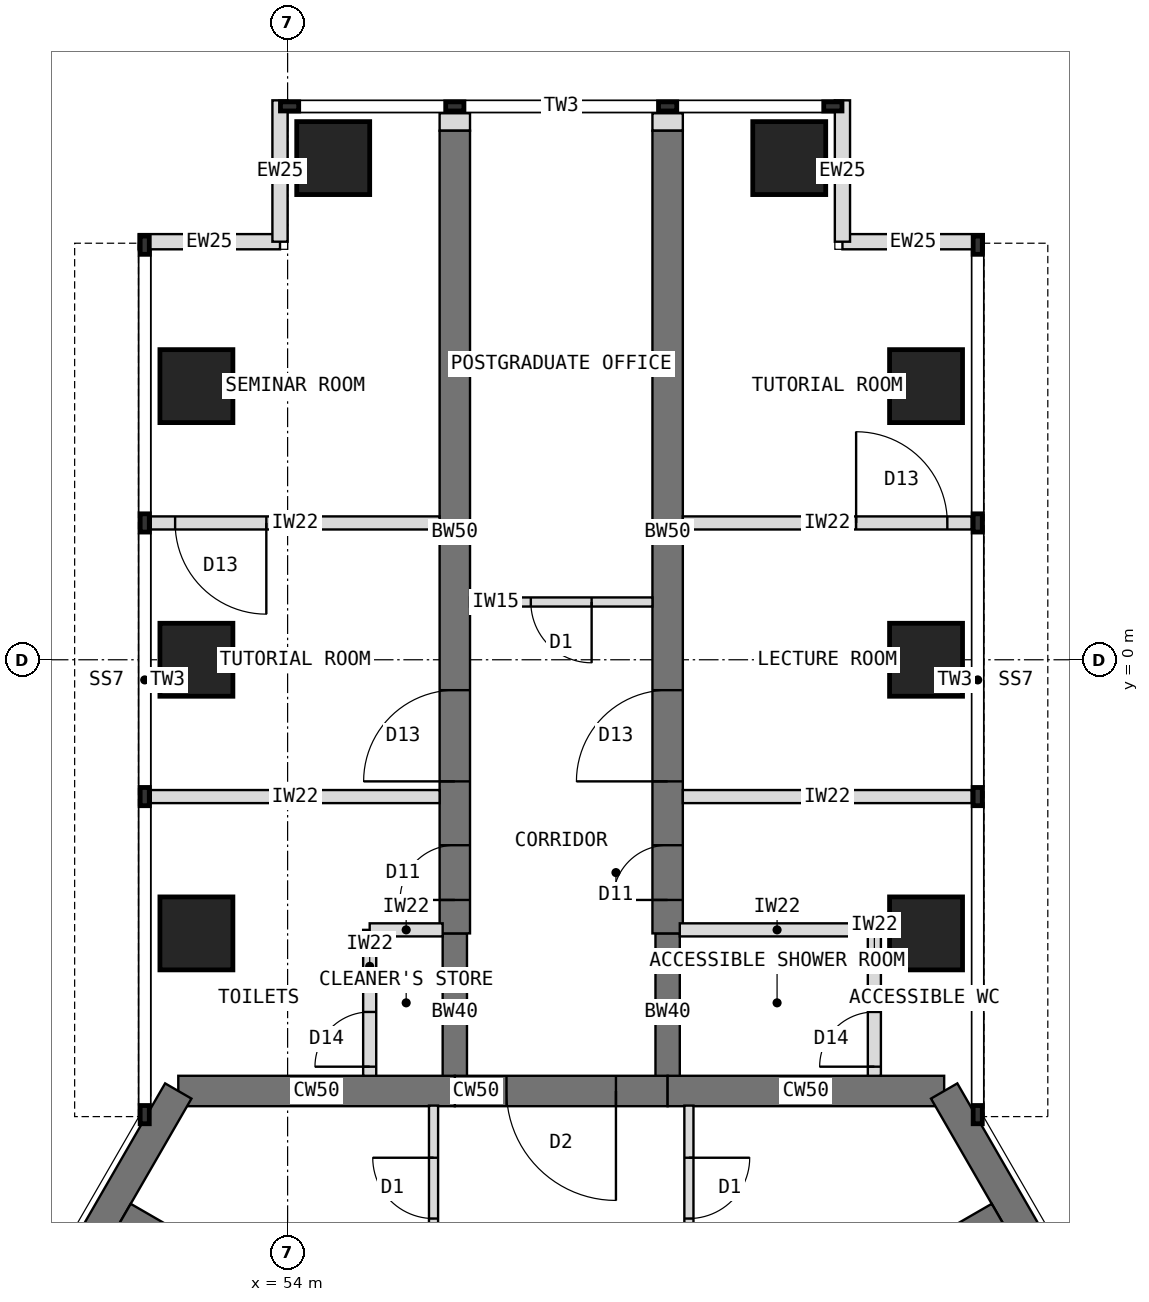
"""IFC4 building model, lengths in metres.
Left out: names, types, materials, properties, quantities, classifications, styles, units other than length and angle.
Written with IfcOpenShell. Run it as: python <this file> out.ifc"""

import sys

from ifc_helpers import new_model, si_unit, direction, frame, frame_2d, origin, origin_2d, place, context, subcontext, project, spatial, rectangle, extrude, element, fill, save


model = new_model("IFC4")
c1 = context("Model", 3, precision=1e-05, world=origin(), true_north=direction((0.0, 1.0)))
c2 = subcontext(c1, "Body", "Model", "MODEL_VIEW")
j1 = project(units=[si_unit("LENGTHUNIT", "METRE"), si_unit("PLANEANGLEUNIT", "RADIAN")], contexts=[c1])
p1 = place(None, origin())
s1 = spatial("IfcSite", under=j1, at=p1, CompositionType="ELEMENT")
p2 = place(p1, origin())
s2 = spatial("IfcBuilding", under=s1, at=p2, CompositionType="ELEMENT")
p3 = place(p2, frame((0.0, 0.0, 186.5)))
s3 = spatial("IfcBuildingStorey", under=s2, at=p3, CompositionType="ELEMENT", Elevation=186.5)
p4 = place(p3, frame((64.798, -7.092, 0.0), z_axis=(0.0, 0.0, 1.0), x_axis=(-1.0, 0.0, 0.0)))
e1 = element("IfcWall", 1, at=p4, inside=s3, PredefinedType="SHEAR", context=c2, shape_type="SweptSolid", body=[
    extrude(rectangle(XDim=4.548, YDim=0.5, at=frame_2d((2.274, 0.0))), origin(), (0.0, 0.0, 1.0), 4.0),
])
p5 = place(p3, frame((60.25, -7.092, 0.0), z_axis=(0.0, 0.0, 1.0), x_axis=(-1.0, 0.0, 0.0)))
e2 = element("IfcWall", 2, at=p5, inside=s3, PredefinedType="SHEAR", context=c2, shape_type="SweptSolid", body=[
    extrude(rectangle(XDim=3.5, YDim=0.5, at=frame_2d((1.75, 0.0))), origin(), (0.0, 0.0, 1.0), 4.0),
])
p6 = place(p5, frame((0.85, 0.0, 0.0)))
e3 = element("IfcOpeningElement", 3, at=p6, cuts=e2, PredefinedType="OPENING", context=c2, shape_type="SweptSolid", body=[
    extrude(rectangle(XDim=1.8, YDim=2.1, at=frame_2d((0.9, 1.05))), frame((0.0, 0.26, 0.0), z_axis=(0.0, -1.0, 0.0), x_axis=(1.0, 0.0, 0.0)), (0.0, 0.0, 1.0), 0.52),
])
p7 = place(p3, frame((56.75, -7.092, 0.0), z_axis=(0.0, 0.0, 1.0), x_axis=(-1.0, 0.0, 0.0)))
e4 = element("IfcWall", 4, at=p7, inside=s3, PredefinedType="SHEAR", context=c2, shape_type="SweptSolid", body=[
    extrude(rectangle(XDim=4.548, YDim=0.5, at=frame_2d((2.274, 0.0))), origin(), (0.0, 0.0, 1.0), 4.0),
])
for number, where, z_axis, x_axis in (
    (5, (52.202, -7.092, 0.0), (0.0, 0.0, 1.0), (-0.5, -0.866, 0.0)),
    (6, (71.096, -18.0, 0.0), (0.0, 0.0, 1.0), (-0.5, 0.866, 0.0)),
):
    element("IfcWall", number, at=place(p3, frame(where, z_axis=z_axis, x_axis=x_axis)), inside=s3, PredefinedType="SHEAR", context=c2, shape_type="SweptSolid", body=[
        extrude(rectangle(XDim=12.596, YDim=0.5, at=frame_2d((6.298, 0.0))), origin(), (0.0, 0.0, 1.0), 4.0),
    ])
p8 = place(p3, frame((56.75, -7.092, 0.0), z_axis=(0.0, 0.0, 1.0), x_axis=(0.0, 1.0, 0.0)))
e7 = element("IfcWall", 7, at=p8, inside=s3, PredefinedType="SHEAR", context=c2, shape_type="SweptSolid", body=[
    extrude(rectangle(XDim=2.592, YDim=0.4, at=frame_2d((1.296, 0.0))), origin(), (0.0, 0.0, 1.0), 4.0),
])
p9 = place(p3, frame((56.75, -4.5, 0.0), z_axis=(0.0, 0.0, 1.0), x_axis=(0.0, 1.0, 0.0)))
e8 = element("IfcWall", 8, at=p9, inside=s3, PredefinedType="SHEAR", context=c2, shape_type="SweptSolid", body=[
    extrude(rectangle(XDim=13.2, YDim=0.5, at=frame_2d((6.6, 0.0))), origin(), (0.0, 0.0, 1.0), 4.0),
])
p10 = place(p9, frame((0.55, 0.0, 0.0)))
e9 = element("IfcOpeningElement", 9, at=p10, cuts=e8, PredefinedType="OPENING", context=c2, shape_type="SweptSolid", body=[
    extrude(rectangle(XDim=0.9, YDim=2.1, at=frame_2d((0.45, 1.05))), frame((0.0, 0.26, 0.0), z_axis=(0.0, -1.0, 0.0), x_axis=(1.0, 0.0, 0.0)), (0.0, 0.0, 1.0), 0.52),
])
p11 = place(p9, frame((2.5, 0.0, 0.0)))
e10 = element("IfcOpeningElement", 10, at=p11, cuts=e8, PredefinedType="OPENING", context=c2, shape_type="SweptSolid", body=[
    extrude(rectangle(XDim=1.5, YDim=2.1, at=frame_2d((0.75, 1.05))), frame((0.0, 0.26, 0.0), z_axis=(0.0, -1.0, 0.0), x_axis=(1.0, 0.0, 0.0)), (0.0, 0.0, 1.0), 0.52),
])
p12 = place(p3, frame((60.25, -7.092, 0.0), z_axis=(0.0, 0.0, 1.0), x_axis=(0.0, 1.0, 0.0)))
e11 = element("IfcWall", 11, at=p12, inside=s3, PredefinedType="SHEAR", context=c2, shape_type="SweptSolid", body=[
    extrude(rectangle(XDim=2.592, YDim=0.4, at=frame_2d((1.296, 0.0))), origin(), (0.0, 0.0, 1.0), 4.0),
])
p13 = place(p3, frame((60.25, -4.5, 0.0), z_axis=(0.0, 0.0, 1.0), x_axis=(0.0, 1.0, 0.0)))
e12 = element("IfcWall", 12, at=p13, inside=s3, PredefinedType="SHEAR", context=c2, shape_type="SweptSolid", body=[
    extrude(rectangle(XDim=13.2, YDim=0.5, at=frame_2d((6.6, 0.0))), origin(), (0.0, 0.0, 1.0), 4.0),
])
p14 = place(p13, frame((0.55, 0.0, 0.0)))
e13 = element("IfcOpeningElement", 13, at=p14, cuts=e12, PredefinedType="OPENING", context=c2, shape_type="SweptSolid", body=[
    extrude(rectangle(XDim=0.9, YDim=2.1, at=frame_2d((0.45, 1.05))), frame((0.0, 0.26, 0.0), z_axis=(0.0, -1.0, 0.0), x_axis=(1.0, 0.0, 0.0)), (0.0, 0.0, 1.0), 0.52),
])
p15 = place(p13, frame((2.5, 0.0, 0.0)))
e14 = element("IfcOpeningElement", 14, at=p15, cuts=e12, PredefinedType="OPENING", context=c2, shape_type="SweptSolid", body=[
    extrude(rectangle(XDim=1.5, YDim=2.1, at=frame_2d((0.75, 1.05))), frame((0.0, 0.26, 0.0), z_axis=(0.0, -1.0, 0.0), x_axis=(1.0, 0.0, 0.0)), (0.0, 0.0, 1.0), 0.52),
])
for number, where, z_axis, x_axis in (
    (15, (52.5, -4.5, 0.0), (0.0, 0.0, 1.0), (1.0, 0.0, 0.0)),
    (16, (64.5, -4.5, 0.0), (0.0, 0.0, 1.0), (1.0, 0.0, 0.0)),
    (17, (52.5, 0.0, 0.0), (0.0, 0.0, 1.0), (1.0, 0.0, 0.0)),
    (18, (64.5, 0.0, 0.0), (0.0, 0.0, 1.0), (1.0, 0.0, 0.0)),
    (19, (52.5, 4.5, 0.0), (0.0, 0.0, 1.0), (1.0, 0.0, 0.0)),
    (20, (64.5, 4.5, 0.0), (0.0, 0.0, 1.0), (1.0, 0.0, 0.0)),
    (21, (54.75, 8.25, 0.0), (0.0, 0.0, 1.0), (1.0, 0.0, 0.0)),
    (22, (62.25, 8.25, 0.0), (0.0, 0.0, 1.0), (1.0, 0.0, 0.0)),
):
    element("IfcColumn", number, at=place(p3, frame(where, z_axis=z_axis, x_axis=x_axis)), inside=s3, PredefinedType="COLUMN", context=c2, shape_type="SweptSolid", body=[
        extrude(rectangle(XDim=1.2, YDim=1.2, at=origin_2d()), origin(), (0.0, 0.0, 1.0), 4.0),
    ])
for number, where, z_axis, x_axis in (
    (23, (51.55, 6.875, 0.0), (0.0, 0.0, 1.0), (1.0, 0.0, 0.0)),
    (24, (53.875, 6.875, 0.0), (0.0, 0.0, 1.0), (0.0, 1.0, 0.0)),
    (25, (65.45, 6.875, 0.0), (0.0, 0.0, 1.0), (-1.0, 0.0, 0.0)),
    (26, (63.125, 6.875, 0.0), (0.0, 0.0, 1.0), (0.0, 1.0, 0.0)),
):
    element("IfcWall", number, at=place(p3, frame(where, z_axis=z_axis, x_axis=x_axis)), inside=s3, PredefinedType="STANDARD", context=c2, shape_type="SweptSolid", body=[
        extrude(rectangle(XDim=2.325, YDim=0.25, at=frame_2d((1.163, 0.0))), origin(), (0.0, 0.0, 1.0), 3.8),
    ])
for number, where, z_axis, x_axis in (
    (27, (56.75, 8.7, 0.0), (0.0, 0.0, 1.0), (0.0, 1.0, 0.0)),
    (28, (60.25, 8.7, 0.0), (0.0, 0.0, 1.0), (0.0, 1.0, 0.0)),
):
    element("IfcWall", number, at=place(p3, frame(where, z_axis=z_axis, x_axis=x_axis)), inside=s3, PredefinedType="PARTITIONING", context=c2, shape_type="SweptSolid", body=[
        extrude(rectangle(XDim=0.288, YDim=0.5, at=frame_2d((0.144, 0.0))), origin(), (0.0, 0.0, 1.0), 3.8),
    ])
for number, where, z_axis, x_axis in (
    (29, (56.48, -12.099, 0.0), (0.0, 0.0, 1.0), (-0.866, 0.5, 0.0)),
    (30, (60.52, -12.099, 0.0), (0.0, 0.0, 1.0), (0.866, 0.5, 0.0)),
):
    element("IfcWall", number, at=place(p3, frame(where, z_axis=z_axis, x_axis=x_axis)), inside=s3, PredefinedType="SHEAR", context=c2, shape_type="SweptSolid", body=[
        extrude(rectangle(XDim=5.958, YDim=0.4, at=frame_2d((2.979, 0.0))), origin(), (0.0, 0.0, 1.0), 4.0),
    ])
p16 = place(p3, frame((56.5, -2.25, 0.0), z_axis=(0.0, 0.0, 1.0), x_axis=(-1.0, 0.0, 0.0)))
e31 = element("IfcWall", 31, at=p16, inside=s3, PredefinedType="PARTITIONING", context=c2, shape_type="SweptSolid", body=[
    extrude(rectangle(XDim=4.75, YDim=0.215, at=frame_2d((2.375, 0.0))), origin(), (0.0, 0.0, 1.0), 3.8),
])
p17 = place(p3, frame((56.5, 2.25, 0.0), z_axis=(0.0, 0.0, 1.0), x_axis=(-1.0, 0.0, 0.0)))
e32 = element("IfcWall", 32, at=p17, inside=s3, PredefinedType="PARTITIONING", context=c2, shape_type="SweptSolid", body=[
    extrude(rectangle(XDim=4.75, YDim=0.215, at=frame_2d((2.375, 0.0))), origin(), (0.0, 0.0, 1.0), 3.8),
])
p18 = place(p17, frame((2.85, 0.0, 0.0)))
e33 = element("IfcOpeningElement", 33, at=p18, cuts=e32, PredefinedType="OPENING", context=c2, shape_type="SweptSolid", body=[
    extrude(rectangle(XDim=1.5, YDim=2.1, at=frame_2d((0.75, 1.05))), frame((0.0, 0.117, 0.0), z_axis=(0.0, -1.0, 0.0), x_axis=(1.0, 0.0, 0.0)), (0.0, 0.0, 1.0), 0.235),
])
p19 = place(p3, frame((55.35, -6.842, 0.0), z_axis=(0.0, 0.0, 1.0), x_axis=(0.0, 1.0, 0.0)))
e34 = element("IfcWall", 34, at=p19, inside=s3, PredefinedType="PARTITIONING", context=c2, shape_type="SweptSolid", body=[
    extrude(rectangle(XDim=2.4, YDim=0.215, at=frame_2d((1.2, 0.0))), origin(), (0.0, 0.0, 1.0), 3.8),
])
p20 = place(p19, frame((0.15, 0.0, 0.0)))
e35 = element("IfcOpeningElement", 35, at=p20, cuts=e34, PredefinedType="OPENING", context=c2, shape_type="SweptSolid", body=[
    extrude(rectangle(XDim=0.9, YDim=2.1, at=frame_2d((0.45, 1.05))), frame((0.0, 0.117, 0.0), z_axis=(0.0, -1.0, 0.0), x_axis=(1.0, 0.0, 0.0)), (0.0, 0.0, 1.0), 0.235),
])
p21 = place(p3, frame((56.55, -4.442, 0.0), z_axis=(0.0, 0.0, 1.0), x_axis=(-1.0, 0.0, 0.0)))
e36 = element("IfcWall", 36, at=p21, inside=s3, PredefinedType="PARTITIONING", context=c2, shape_type="SweptSolid", body=[
    extrude(rectangle(XDim=1.2, YDim=0.215, at=frame_2d((0.6, 0.0))), origin(), (0.0, 0.0, 1.0), 3.267),
])
p22 = place(p3, frame((60.5, -2.25, 0.0), z_axis=(0.0, 0.0, 1.0), x_axis=(1.0, 0.0, 0.0)))
e37 = element("IfcWall", 37, at=p22, inside=s3, PredefinedType="PARTITIONING", context=c2, shape_type="SweptSolid", body=[
    extrude(rectangle(XDim=4.75, YDim=0.215, at=frame_2d((2.375, 0.0))), origin(), (0.0, 0.0, 1.0), 3.8),
])
p23 = place(p3, frame((60.5, 2.25, 0.0), z_axis=(0.0, 0.0, 1.0), x_axis=(1.0, 0.0, 0.0)))
e38 = element("IfcWall", 38, at=p23, inside=s3, PredefinedType="PARTITIONING", context=c2, shape_type="SweptSolid", body=[
    extrude(rectangle(XDim=4.75, YDim=0.215, at=frame_2d((2.375, 0.0))), origin(), (0.0, 0.0, 1.0), 3.8),
])
p24 = place(p23, frame((2.85, 0.0, 0.0)))
e39 = element("IfcOpeningElement", 39, at=p24, cuts=e38, PredefinedType="OPENING", context=c2, shape_type="SweptSolid", body=[
    extrude(rectangle(XDim=1.5, YDim=2.1, at=frame_2d((0.75, 1.05))), frame((0.0, 0.117, 0.0), z_axis=(0.0, -1.0, 0.0), x_axis=(1.0, 0.0, 0.0)), (0.0, 0.0, 1.0), 0.235),
])
p25 = place(p3, frame((63.65, -6.842, 0.0), z_axis=(0.0, 0.0, 1.0), x_axis=(0.0, 1.0, 0.0)))
e40 = element("IfcWall", 40, at=p25, inside=s3, PredefinedType="PARTITIONING", context=c2, shape_type="SweptSolid", body=[
    extrude(rectangle(XDim=2.4, YDim=0.215, at=frame_2d((1.2, 0.0))), origin(), (0.0, 0.0, 1.0), 3.8),
])
p26 = place(p25, frame((0.15, 0.0, 0.0)))
e41 = element("IfcOpeningElement", 41, at=p26, cuts=e40, PredefinedType="OPENING", context=c2, shape_type="SweptSolid", body=[
    extrude(rectangle(XDim=0.9, YDim=2.1, at=frame_2d((0.45, 1.05))), frame((0.0, 0.117, 0.0), z_axis=(0.0, -1.0, 0.0), x_axis=(1.0, 0.0, 0.0)), (0.0, 0.0, 1.0), 0.235),
])
p27 = place(p3, frame((60.45, -4.442, 0.0), z_axis=(0.0, 0.0, 1.0), x_axis=(1.0, 0.0, 0.0)))
e42 = element("IfcWall", 42, at=p27, inside=s3, PredefinedType="PARTITIONING", context=c2, shape_type="SweptSolid", body=[
    extrude(rectangle(XDim=3.2, YDim=0.215, at=frame_2d((1.6, 0.0))), origin(), (0.0, 0.0, 1.0), 3.267),
])
p28 = place(p3, frame((56.4, -11.857, 0.0), z_axis=(0.0, 0.0, 1.0), x_axis=(0.0, 1.0, 0.0)))
e43 = element("IfcWall", 43, at=p28, inside=s3, PredefinedType="PARTITIONING", context=c2, shape_type="SweptSolid", body=[
    extrude(rectangle(XDim=4.526, YDim=0.15, at=frame_2d((2.263, 0.0))), origin(), (0.0, 0.0, 1.0), 3.8),
])
p29 = place(p28, frame((2.668, 0.0, 0.0)))
e44 = element("IfcOpeningElement", 44, at=p29, cuts=e43, PredefinedType="OPENING", context=c2, shape_type="SweptSolid", body=[
    extrude(rectangle(XDim=1.0, YDim=2.1, at=frame_2d((0.5, 1.05))), frame((0.0, 0.085, 0.0), z_axis=(0.0, -1.0, 0.0), x_axis=(1.0, 0.0, 0.0)), (0.0, 0.0, 1.0), 0.17),
])
p30 = place(p3, frame((60.6, -7.332, 0.0), z_axis=(0.0, 0.0, 1.0), x_axis=(0.0, -1.0, 0.0)))
e45 = element("IfcWall", 45, at=p30, inside=s3, PredefinedType="PARTITIONING", context=c2, shape_type="SweptSolid", body=[
    extrude(rectangle(XDim=4.526, YDim=0.15, at=frame_2d((2.263, 0.0))), origin(), (0.0, 0.0, 1.0), 3.8),
])
p31 = place(p30, frame((0.858, 0.0, 0.0)))
e46 = element("IfcOpeningElement", 46, at=p31, cuts=e45, PredefinedType="OPENING", context=c2, shape_type="SweptSolid", body=[
    extrude(rectangle(XDim=1.0, YDim=2.1, at=frame_2d((0.5, 1.05))), frame((0.0, 0.085, 0.0), z_axis=(0.0, -1.0, 0.0), x_axis=(1.0, 0.0, 0.0)), (0.0, 0.0, 1.0), 0.17),
])
p32 = place(p3, frame((60.0, 0.95, 0.0), z_axis=(0.0, 0.0, 1.0), x_axis=(-1.0, 0.0, 0.0)))
e47 = element("IfcWall", 47, at=p32, inside=s3, PredefinedType="PARTITIONING", context=c2, shape_type="SweptSolid", body=[
    extrude(rectangle(XDim=3.0, YDim=0.15, at=frame_2d((1.5, 0.0))), origin(), (0.0, 0.0, 1.0), 3.8),
])
p33 = place(p32, frame((1.0, 0.0, 0.0)))
e48 = element("IfcOpeningElement", 48, at=p33, cuts=e47, PredefinedType="OPENING", context=c2, shape_type="SweptSolid", body=[
    extrude(rectangle(XDim=1.0, YDim=2.1, at=frame_2d((0.5, 1.05))), frame((0.0, 0.085, 0.0), z_axis=(0.0, -1.0, 0.0), x_axis=(1.0, 0.0, 0.0)), (0.0, 0.0, 1.0), 0.17),
])
p34 = place(p6, origin())
e49 = element("IfcDoor", 49, at=p34, inside=s3, OperationType="DOUBLE_DOOR_DOUBLE_SWING", PredefinedType="DOOR", context=c2, shape_type="SweptSolid", body=[
    extrude(rectangle(XDim=1.8, YDim=2.1, at=frame_2d((0.9, 1.05))), frame((0.0, 0.025, 0.0), z_axis=(0.0, -1.0, 0.0), x_axis=(1.0, 0.0, 0.0)), (0.0, 0.0, 1.0), 0.05),
])
fill(e3, e49)
p35 = place(p18, origin())
e50 = element("IfcDoor", 50, at=p35, inside=s3, OperationType="DOUBLE_DOOR_SINGLE_SWING", PredefinedType="DOOR", context=c2, shape_type="SweptSolid", body=[
    extrude(rectangle(XDim=1.5, YDim=2.1, at=frame_2d((0.75, 1.05))), frame((0.0, 0.025, 0.0), z_axis=(0.0, -1.0, 0.0), x_axis=(1.0, 0.0, 0.0)), (0.0, 0.0, 1.0), 0.05),
])
fill(e33, e50)
p36 = place(p20, origin())
e51 = element("IfcDoor", 51, at=p36, inside=s3, OperationType="SINGLE_SWING_LEFT", PredefinedType="DOOR", context=c2, shape_type="SweptSolid", body=[
    extrude(rectangle(XDim=0.9, YDim=2.1, at=frame_2d((0.45, 1.05))), frame((0.0, 0.025, 0.0), z_axis=(0.0, -1.0, 0.0), x_axis=(1.0, 0.0, 0.0)), (0.0, 0.0, 1.0), 0.05),
])
fill(e35, e51)
p37 = place(p24, origin())
e52 = element("IfcDoor", 52, at=p37, inside=s3, OperationType="DOUBLE_DOOR_SINGLE_SWING", PredefinedType="DOOR", context=c2, shape_type="SweptSolid", body=[
    extrude(rectangle(XDim=1.5, YDim=2.1, at=frame_2d((0.75, 1.05))), frame((0.0, 0.025, 0.0), z_axis=(0.0, -1.0, 0.0), x_axis=(1.0, 0.0, 0.0)), (0.0, 0.0, 1.0), 0.05),
])
fill(e39, e52)
p38 = place(p26, origin())
e53 = element("IfcDoor", 53, at=p38, inside=s3, OperationType="SINGLE_SWING_LEFT", PredefinedType="DOOR", context=c2, shape_type="SweptSolid", body=[
    extrude(rectangle(XDim=0.9, YDim=2.1, at=frame_2d((0.45, 1.05))), frame((0.0, 0.025, 0.0), z_axis=(0.0, -1.0, 0.0), x_axis=(1.0, 0.0, 0.0)), (0.0, 0.0, 1.0), 0.05),
])
fill(e41, e53)
p39 = place(p31, origin())
e54 = element("IfcDoor", 54, at=p39, inside=s3, OperationType="SINGLE_SWING_LEFT", PredefinedType="DOOR", context=c2, shape_type="SweptSolid", body=[
    extrude(rectangle(XDim=1.0, YDim=2.1, at=frame_2d((0.5, 1.05))), frame((0.0, 0.025, 0.0), z_axis=(0.0, -1.0, 0.0), x_axis=(1.0, 0.0, 0.0)), (0.0, 0.0, 1.0), 0.05),
])
fill(e46, e54)
p40 = place(p29, origin())
e55 = element("IfcDoor", 55, at=p40, inside=s3, OperationType="SINGLE_SWING_RIGHT", PredefinedType="DOOR", context=c2, shape_type="SweptSolid", body=[
    extrude(rectangle(XDim=1.0, YDim=2.1, at=frame_2d((0.5, 1.05))), frame((0.0, 0.025, 0.0), z_axis=(0.0, -1.0, 0.0), x_axis=(1.0, 0.0, 0.0)), (0.0, 0.0, 1.0), 0.05),
])
fill(e44, e55)
p41 = place(p33, origin())
e56 = element("IfcDoor", 56, at=p41, inside=s3, OperationType="SINGLE_SWING_LEFT", PredefinedType="DOOR", context=c2, shape_type="SweptSolid", body=[
    extrude(rectangle(XDim=1.0, YDim=2.1, at=frame_2d((0.5, 1.05))), frame((0.0, 0.025, 0.0), z_axis=(0.0, -1.0, 0.0), x_axis=(1.0, 0.0, 0.0)), (0.0, 0.0, 1.0), 0.05),
])
fill(e48, e56)
p42 = place(p10, origin())
e57 = element("IfcDoor", 57, at=p42, inside=s3, OperationType="SINGLE_SWING_LEFT", PredefinedType="DOOR", context=c2, shape_type="SweptSolid", body=[
    extrude(rectangle(XDim=0.9, YDim=2.1, at=frame_2d((0.45, 1.05))), frame((0.0, 0.025, 0.0), z_axis=(0.0, -1.0, 0.0), x_axis=(1.0, 0.0, 0.0)), (0.0, 0.0, 1.0), 0.05),
])
fill(e9, e57)
p43 = place(p11, origin())
e58 = element("IfcDoor", 58, at=p43, inside=s3, OperationType="DOUBLE_DOOR_SINGLE_SWING", PredefinedType="DOOR", context=c2, shape_type="SweptSolid", body=[
    extrude(rectangle(XDim=1.5, YDim=2.1, at=frame_2d((0.75, 1.05))), frame((0.0, 0.025, 0.0), z_axis=(0.0, -1.0, 0.0), x_axis=(1.0, 0.0, 0.0)), (0.0, 0.0, 1.0), 0.05),
])
fill(e10, e58)
p44 = place(p14, origin())
e59 = element("IfcDoor", 59, at=p44, inside=s3, OperationType="SINGLE_SWING_LEFT", PredefinedType="DOOR", context=c2, shape_type="SweptSolid", body=[
    extrude(rectangle(XDim=0.9, YDim=2.1, at=frame_2d((0.45, 1.05))), frame((0.0, 0.025, 0.0), z_axis=(0.0, -1.0, 0.0), x_axis=(1.0, 0.0, 0.0)), (0.0, 0.0, 1.0), 0.05),
])
fill(e13, e59)
p45 = place(p15, origin())
e60 = element("IfcDoor", 60, at=p45, inside=s3, OperationType="DOUBLE_DOOR_SINGLE_SWING", PredefinedType="DOOR", context=c2, shape_type="SweptSolid", body=[
    extrude(rectangle(XDim=1.5, YDim=2.1, at=frame_2d((0.75, 1.05))), frame((0.0, 0.025, 0.0), z_axis=(0.0, -1.0, 0.0), x_axis=(1.0, 0.0, 0.0)), (0.0, 0.0, 1.0), 0.05),
])
fill(e14, e60)
save(model, sys.argv[1])
